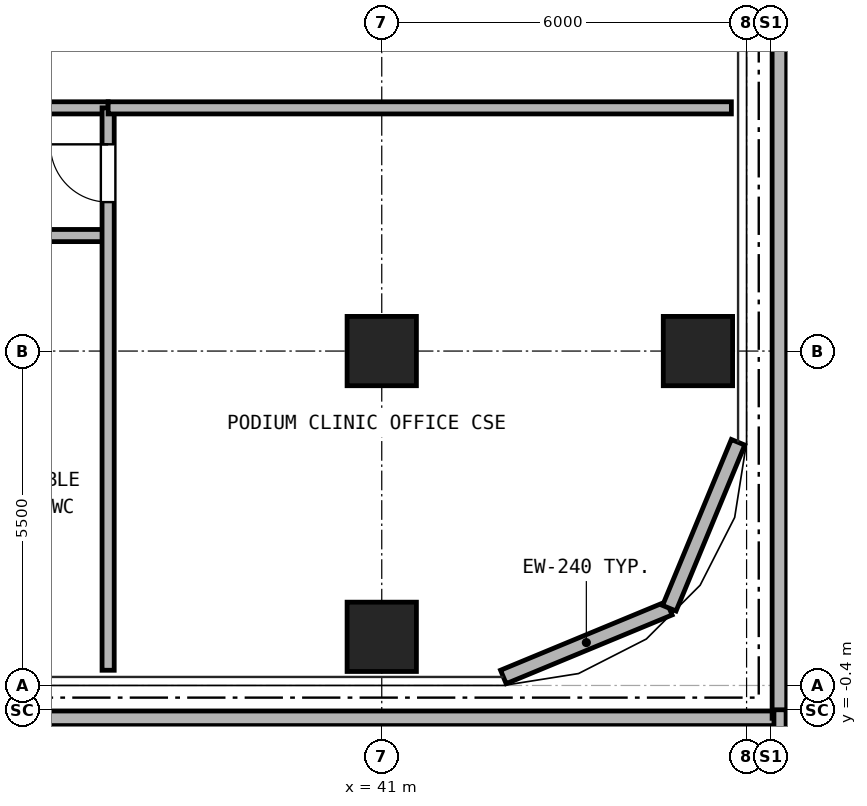
"""IFC4 building model, lengths in metres.
Left out: names, types, materials, properties, quantities, classifications, styles, units other than length and angle.
Written with IfcOpenShell. Run it as: python <this file> out.ifc"""

import sys

from ifc_helpers import new_model, si_unit, direction, frame, frame_2d, origin, origin_2d, place, context, subcontext, project, spatial, rectangle, hollow_rectangle, extrude, source, transform, mapped, element, fill, save


model = new_model("IFC4")
c1 = context("Model", 3, precision=1e-05, world=origin(), true_north=direction((0.0, 1.0)))
c2 = subcontext(c1, "Body", "Model", "MODEL_VIEW")
j1 = project(units=[si_unit("LENGTHUNIT", "METRE"), si_unit("PLANEANGLEUNIT", "RADIAN")], contexts=[c1])
p1 = place(None, origin())
s1 = spatial("IfcSite", under=j1, at=p1, CompositionType="ELEMENT")
p2 = place(p1, origin())
s2 = spatial("IfcBuilding", under=s1, at=p2, CompositionType="ELEMENT")
p3 = place(p2, frame((0.0, 0.0, 13.5)))
s3 = spatial("IfcBuildingStorey", under=s2, at=p3, CompositionType="ELEMENT", Elevation=13.5)
m1 = source(origin(), c2, "Body", "SweptSolid", [
    extrude(hollow_rectangle(XDim=1.14, YDim=1.14, WallThickness=0.07, at=origin_2d()), origin(), (0.0, 0.0, 1.0), 4.18),
])
for number, where, z_axis, x_axis in (
    (1, (41.0, 0.8, 0.0), (0.0, 0.0, 1.0), (1.0, 0.0, 0.0)),
    (2, (46.2, 5.5, 0.0), (0.0, 0.0, 1.0), (1.0, 0.0, 0.0)),
    (3, (41.0, 5.5, 0.0), (0.0, 0.0, 1.0), (1.0, 0.0, 0.0)),
):
    element("IfcColumn", number, at=place(p3, frame(where, z_axis=z_axis, x_axis=x_axis)), inside=s3, PredefinedType="COLUMN", context=c2, shape_type="MappedRepresentation", body=[
        mapped(m1, transform((0.0, 0.0, 0.0), x_axis=(1.0, 0.0, 0.0), y_axis=(0.0, 1.0, 0.0), z_axis=(0.0, 0.0, 1.0), scale=1.0)),
    ])
for number, where, z_axis, x_axis in (
    (4, (43.0, 0.14, 0.0), (0.0, 0.0, 1.0), (0.924, 0.383, 0.0)),
    (5, (45.729, 1.271, 0.0), (0.0, 0.0, 1.0), (0.383, 0.924, 0.0)),
):
    element("IfcWall", number, at=place(p3, frame(where, z_axis=z_axis, x_axis=x_axis)), inside=s3, PredefinedType="SOLIDWALL", context=c2, shape_type="SweptSolid", body=[
        extrude(rectangle(XDim=2.954, YDim=0.24, at=frame_2d((1.477, 0.0))), origin(), (0.0, 0.0, 1.0), 4.18),
    ])
p4 = place(p3, frame((0.2, -0.54, 0.0), z_axis=(0.0, 0.0, 1.0), x_axis=(1.0, 0.0, 0.0)))
e6 = element("IfcWall", 6, at=p4, inside=s3, PredefinedType="SOLIDWALL", context=c2, shape_type="SweptSolid", body=[
    extrude(rectangle(XDim=47.34, YDim=0.24, at=frame_2d((23.67, 0.0))), origin(), (0.0, 0.0, 1.0), 4.18),
])
p5 = place(p3, frame((47.54, -0.54, 0.0), z_axis=(0.0, 0.0, 1.0), x_axis=(0.0, 1.0, 0.0)))
e7 = element("IfcWall", 7, at=p5, inside=s3, PredefinedType="SOLIDWALL", context=c2, shape_type="SweptSolid", body=[
    extrude(rectangle(XDim=40.89, YDim=0.24, at=frame_2d((20.445, 0.0))), origin(), (0.0, 0.0, 1.0), 4.18),
])
p6 = place(p3, frame((10.5, 7.4, 0.0), z_axis=(0.0, 0.0, 1.0), x_axis=(1.0, 0.0, 0.0)))
e8 = element("IfcWall", 8, at=p6, inside=s3, PredefinedType="PARTITIONING", context=c2, shape_type="SweptSolid", body=[
    extrude(rectangle(XDim=26.0, YDim=0.2, at=frame_2d((13.0, 0.0))), origin(), (0.0, 0.0, 1.0), 4.18),
])
p7 = place(p6, frame((3.5, 0.0, 0.0)))
e9 = element("IfcOpeningElement", 9, at=p7, cuts=e8, PredefinedType="OPENING", context=c2, shape_type="SweptSolid", body=[
    extrude(rectangle(XDim=0.95, YDim=2.15, at=frame_2d((0.475, 1.075))), frame((0.0, 0.11, 0.0), z_axis=(0.0, -1.0, 0.0), x_axis=(1.0, 0.0, 0.0)), (0.0, 0.0, 1.0), 0.22),
])
p8 = place(p6, frame((11.0, 0.0, 0.0)))
e10 = element("IfcOpeningElement", 10, at=p8, cuts=e8, PredefinedType="OPENING", context=c2, shape_type="SweptSolid", body=[
    extrude(rectangle(XDim=0.95, YDim=2.15, at=frame_2d((0.475, 1.075))), frame((0.0, 0.11, 0.0), z_axis=(0.0, -1.0, 0.0), x_axis=(1.0, 0.0, 0.0)), (0.0, 0.0, 1.0), 0.22),
])
p9 = place(p6, frame((17.15, 0.0, 0.0)))
e11 = element("IfcOpeningElement", 11, at=p9, cuts=e8, PredefinedType="OPENING", context=c2, shape_type="SweptSolid", body=[
    extrude(rectangle(XDim=0.95, YDim=2.15, at=frame_2d((0.475, 1.075))), frame((0.0, 0.11, 0.0), z_axis=(0.0, -1.0, 0.0), x_axis=(1.0, 0.0, 0.0)), (0.0, 0.0, 1.0), 0.22),
])
p10 = place(p6, frame((21.2, 0.0, 0.0)))
e12 = element("IfcOpeningElement", 12, at=p10, cuts=e8, PredefinedType="OPENING", context=c2, shape_type="SweptSolid", body=[
    extrude(rectangle(XDim=0.92, YDim=2.1, at=frame_2d((0.46, 1.05))), frame((0.0, 0.11, 0.0), z_axis=(0.0, -1.0, 0.0), x_axis=(1.0, 0.0, 0.0)), (0.0, 0.0, 1.0), 0.22),
])
p11 = place(p6, frame((24.05, 0.0, 0.0)))
e13 = element("IfcOpeningElement", 13, at=p11, cuts=e8, PredefinedType="OPENING", context=c2, shape_type="SweptSolid", body=[
    extrude(rectangle(XDim=0.92, YDim=2.1, at=frame_2d((0.46, 1.05))), frame((0.0, 0.11, 0.0), z_axis=(0.0, -1.0, 0.0), x_axis=(1.0, 0.0, 0.0)), (0.0, 0.0, 1.0), 0.22),
])
p12 = place(p3, frame((30.7, 9.5, 0.0), z_axis=(0.0, 0.0, 1.0), x_axis=(1.0, 0.0, 0.0)))
e14 = element("IfcWall", 14, at=p12, inside=s3, PredefinedType="PARTITIONING", context=c2, shape_type="SweptSolid", body=[
    extrude(rectangle(XDim=5.8, YDim=0.2, at=frame_2d((2.9, 0.0))), origin(), (0.0, 0.0, 1.0), 4.18),
])
p13 = place(p3, frame((36.5, 0.25, 0.0), z_axis=(0.0, 0.0, 1.0), x_axis=(0.0, 1.0, 0.0)))
e15 = element("IfcWall", 15, at=p13, inside=s3, PredefinedType="PARTITIONING", context=c2, shape_type="SweptSolid", body=[
    extrude(rectangle(XDim=9.25, YDim=0.2, at=frame_2d((4.625, 0.0))), origin(), (0.0, 0.0, 1.0), 4.18),
])
p14 = place(p13, frame((7.7, 0.0, 0.0)))
e16 = element("IfcOpeningElement", 16, at=p14, cuts=e15, PredefinedType="OPENING", context=c2, shape_type="SweptSolid", body=[
    extrude(rectangle(XDim=0.95, YDim=2.15, at=frame_2d((0.475, 1.075))), frame((0.0, 0.11, 0.0), z_axis=(0.0, -1.0, 0.0), x_axis=(1.0, 0.0, 0.0)), (0.0, 0.0, 1.0), 0.22),
])
p15 = place(p3, frame((36.5, 9.5, 0.0), z_axis=(0.0, 0.0, 1.0), x_axis=(1.0, 0.0, 0.0)))
e17 = element("IfcWall", 17, at=p15, inside=s3, PredefinedType="PARTITIONING", context=c2, shape_type="SweptSolid", body=[
    extrude(rectangle(XDim=10.25, YDim=0.2, at=frame_2d((5.125, 0.0))), origin(), (0.0, 0.0, 1.0), 4.18),
])
p16 = place(p3, frame((47.55, -10.95, 0.0), z_axis=(0.0, 0.0, 1.0), x_axis=(0.0, 1.0, 0.0)))
e18 = element("IfcWall", 18, at=p16, inside=s3, PredefinedType="PARTITIONING", context=c2, shape_type="SweptSolid", body=[
    extrude(rectangle(XDim=10.55, YDim=0.2, at=frame_2d((5.275, 0.0))), origin(), (0.0, 0.0, 1.0), 4.18),
])
p17 = place(p16, frame((5.35, 0.0, 0.0)))
e19 = element("IfcOpeningElement", 19, at=p17, cuts=e18, PredefinedType="OPENING", context=c2, shape_type="SweptSolid", body=[
    extrude(rectangle(XDim=1.3, YDim=2.2, at=frame_2d((0.65, 1.1))), frame((0.0, 0.11, 0.0), z_axis=(0.0, -1.0, 0.0), x_axis=(1.0, 0.0, 0.0)), (0.0, 0.0, 1.0), 0.22),
])
p18 = place(p14, origin())
e20 = element("IfcDoor", 20, at=p18, inside=s3, OperationType="SINGLE_SWING_RIGHT", PredefinedType="DOOR", context=c2, shape_type="SweptSolid", body=[
    extrude(rectangle(XDim=0.95, YDim=2.15, at=frame_2d((0.475, 1.075))), frame((0.0, 0.025, 0.0), z_axis=(0.0, -1.0, 0.0), x_axis=(1.0, 0.0, 0.0)), (0.0, 0.0, 1.0), 0.05),
])
fill(e16, e20)
save(model, sys.argv[1])
